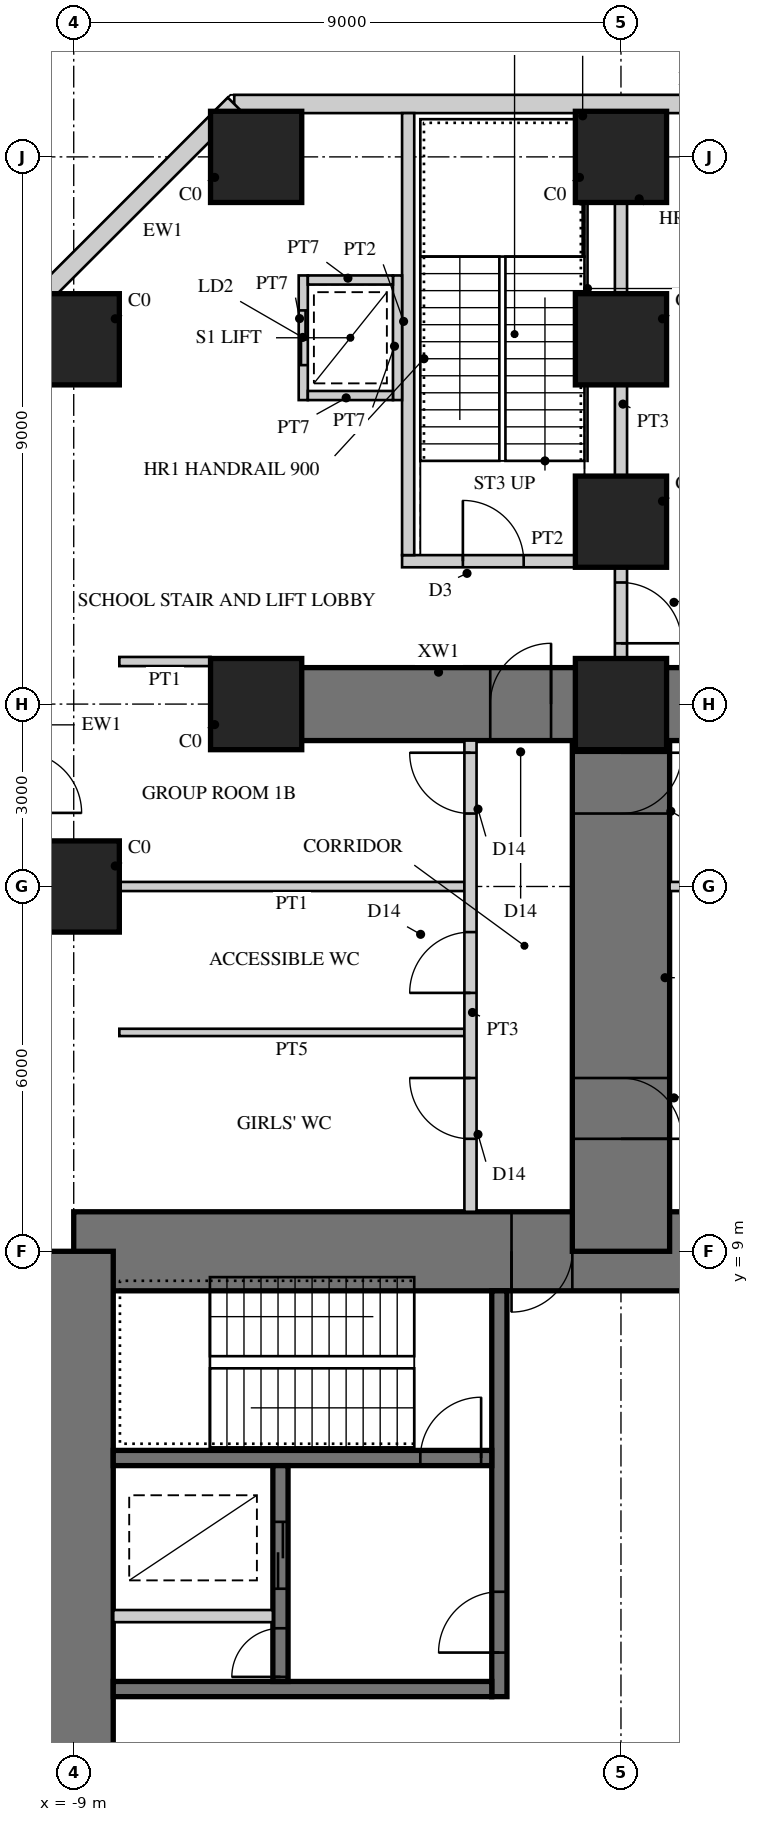
"""IFC4 building model, lengths in metres.
Left out: names, types, materials, properties, quantities, classifications, styles, units other than length and angle.
Written with IfcOpenShell. Run it as: python <this file> out.ifc"""

import sys

from ifc_helpers import new_model, si_unit, direction, frame, frame_2d, origin, origin_2d, place, context, subcontext, project, spatial, rectangle, extrude, element, fill, save


model = new_model("IFC4")
c1 = context("Model", 3, precision=1e-05, world=origin(), true_north=direction((0.0, 1.0)))
c2 = subcontext(c1, "Body", "Model", "MODEL_VIEW")
j1 = project(units=[si_unit("LENGTHUNIT", "METRE"), si_unit("PLANEANGLEUNIT", "RADIAN")], contexts=[c1])
p1 = place(None, origin())
s1 = spatial("IfcSite", under=j1, at=p1, CompositionType="ELEMENT")
p2 = place(p1, origin())
s2 = spatial("IfcBuilding", under=s1, at=p2, CompositionType="ELEMENT")
p3 = place(p2, frame((0.0, 0.0, 5.0)))
s3 = spatial("IfcBuildingStorey", under=s2, at=p3, CompositionType="ELEMENT", Elevation=5.0)
p4 = place(p3, frame((9.0, 9.0, 0.0), z_axis=(0.0, 0.0, 1.0), x_axis=(-1.0, 0.0, 0.0)))
e1 = element("IfcWall", 1, at=p4, inside=s3, PredefinedType="SHEAR", context=c2, shape_type="SweptSolid", body=[
    extrude(rectangle(XDim=18.0, YDim=1.3, at=frame_2d((9.0, 0.0))), origin(), (0.0, 0.0, 1.0), 4.5),
])
p5 = place(p4, frame((9.8, 0.0, 0.0)))
e2 = element("IfcOpeningElement", 2, at=p5, cuts=e1, PredefinedType="OPENING", context=c2, shape_type="SweptSolid", body=[
    extrude(rectangle(XDim=1.0, YDim=2.4, at=frame_2d((0.5, 1.2))), frame((0.0, 0.66, 0.0), z_axis=(0.0, -1.0, 0.0), x_axis=(1.0, 0.0, 0.0)), (0.0, 0.0, 1.0), 1.32),
])
p6 = place(p3, frame((-9.0, 9.0, 0.0), z_axis=(0.0, 0.0, 1.0), x_axis=(0.0, -1.0, 0.0)))
e3 = element("IfcWall", 3, at=p6, inside=s3, PredefinedType="SHEAR", context=c2, shape_type="SweptSolid", body=[
    extrude(rectangle(XDim=18.0, YDim=1.3, at=frame_2d((9.0, 0.0))), origin(), (0.0, 0.0, 1.0), 4.5),
])
p7 = place(p6, frame((9.8, 0.0, 0.0)))
e4 = element("IfcOpeningElement", 4, at=p7, cuts=e3, PredefinedType="OPENING", context=c2, shape_type="SweptSolid", body=[
    extrude(rectangle(XDim=1.0, YDim=2.4, at=frame_2d((0.5, 1.2))), frame((0.0, 0.66, 0.0), z_axis=(0.0, -1.0, 0.0), x_axis=(1.0, 0.0, 0.0)), (0.0, 0.0, 1.0), 1.32),
])
p8 = place(p3, frame((-2.0, 1.675, 0.0), z_axis=(0.0, 0.0, 1.0), x_axis=(0.0, 1.0, 0.0)))
e5 = element("IfcWall", 5, at=p8, inside=s3, PredefinedType="SHEAR", context=c2, shape_type="SweptSolid", body=[
    extrude(rectangle(XDim=6.675, YDim=0.25, at=frame_2d((3.337, 0.0))), origin(), (0.0, 0.0, 1.0), 4.5),
])
p9 = place(p8, frame((0.725, 0.0, 0.0)))
e6 = element("IfcOpeningElement", 6, at=p9, cuts=e5, PredefinedType="OPENING", context=c2, shape_type="SweptSolid", body=[
    extrude(rectangle(XDim=1.0, YDim=2.1, at=frame_2d((0.5, 1.05))), frame((0.0, 0.135, 0.0), z_axis=(0.0, -1.0, 0.0), x_axis=(1.0, 0.0, 0.0)), (0.0, 0.0, 1.0), 0.27),
])
p10 = place(p3, frame((-2.125, 1.8, 0.0), z_axis=(0.0, 0.0, 1.0), x_axis=(-1.0, 0.0, 0.0)))
e7 = element("IfcWall", 7, at=p10, inside=s3, PredefinedType="SHEAR", context=c2, shape_type="SweptSolid", body=[
    extrude(rectangle(XDim=6.225, YDim=0.25, at=frame_2d((3.113, 0.0))), origin(), (0.0, 0.0, 1.0), 4.5),
])
p11 = place(p3, frame((-2.125, 5.6, 0.0), z_axis=(0.0, 0.0, 1.0), x_axis=(-1.0, 0.0, 0.0)))
e8 = element("IfcWall", 8, at=p11, inside=s3, PredefinedType="SHEAR", context=c2, shape_type="SweptSolid", body=[
    extrude(rectangle(XDim=6.225, YDim=0.25, at=frame_2d((3.113, 0.0))), origin(), (0.0, 0.0, 1.0), 4.5),
])
p12 = place(p11, frame((0.175, 0.0, 0.0)))
e9 = element("IfcOpeningElement", 9, at=p12, cuts=e8, PredefinedType="OPENING", context=c2, shape_type="SweptSolid", body=[
    extrude(rectangle(XDim=1.0, YDim=2.1, at=frame_2d((0.5, 1.05))), frame((0.0, 0.135, 0.0), z_axis=(0.0, -1.0, 0.0), x_axis=(1.0, 0.0, 0.0)), (0.0, 0.0, 1.0), 0.27),
])
p13 = place(p3, frame((-5.6, 1.925, 0.0), z_axis=(0.0, 0.0, 1.0), x_axis=(0.0, 1.0, 0.0)))
e10 = element("IfcWall", 10, at=p13, inside=s3, PredefinedType="SHEAR", context=c2, shape_type="SweptSolid", body=[
    extrude(rectangle(XDim=3.55, YDim=0.25, at=frame_2d((1.775, 0.0))), origin(), (0.0, 0.0, 1.0), 4.5),
])
p14 = place(p13, frame((1.525, 0.0, 0.0)))
e11 = element("IfcOpeningElement", 11, at=p14, cuts=e10, PredefinedType="OPENING", context=c2, shape_type="SweptSolid", body=[
    extrude(rectangle(XDim=1.1, YDim=2.2, at=frame_2d((0.55, 1.1))), frame((0.0, 0.135, 0.0), z_axis=(0.0, -1.0, 0.0), x_axis=(1.0, 0.0, 0.0)), (0.0, 0.0, 1.0), 0.27),
])
p15 = place(p13, frame((0.075, 0.0, 0.0)))
e12 = element("IfcOpeningElement", 12, at=p15, cuts=e10, PredefinedType="OPENING", context=c2, shape_type="SweptSolid", body=[
    extrude(rectangle(XDim=0.8, YDim=2.1, at=frame_2d((0.4, 1.05))), frame((0.0, 0.135, 0.0), z_axis=(0.0, -1.0, 0.0), x_axis=(1.0, 0.0, 0.0)), (0.0, 0.0, 1.0), 0.27),
])
p16 = place(p3, frame((-5.725, 3.0, 0.0), z_axis=(0.0, 0.0, 1.0), x_axis=(-1.0, 0.0, 0.0)))
e13 = element("IfcWall", 13, at=p16, inside=s3, PredefinedType="PARTITIONING", context=c2, shape_type="SweptSolid", body=[
    extrude(rectangle(XDim=2.625, YDim=0.2, at=frame_2d((1.312, 0.0))), origin(), (0.0, 0.0, 1.0), 4.5),
])
p17 = place(p3, frame((0.0, 9.0, 0.0), z_axis=(0.0, 0.0, 1.0), x_axis=(0.0, 1.0, 0.0)))
e14 = element("IfcWall", 14, at=p17, inside=s3, PredefinedType="SHEAR", context=c2, shape_type="SweptSolid", body=[
    extrude(rectangle(XDim=9.0, YDim=1.6, at=frame_2d((4.5, 0.0))), origin(), (0.0, 0.0, 1.0), 4.5),
])
p18 = place(p17, frame((1.85, 0.0, 0.0)))
e15 = element("IfcOpeningElement", 15, at=p18, cuts=e14, PredefinedType="OPENING", context=c2, shape_type="SweptSolid", body=[
    extrude(rectangle(XDim=1.0, YDim=2.2, at=frame_2d((0.5, 1.1))), frame((0.0, 0.81, 0.0), z_axis=(0.0, -1.0, 0.0), x_axis=(1.0, 0.0, 0.0)), (0.0, 0.0, 1.0), 1.62),
])
p19 = place(p17, frame((7.2, 0.0, 0.0)))
e16 = element("IfcOpeningElement", 16, at=p19, cuts=e14, PredefinedType="OPENING", context=c2, shape_type="SweptSolid", body=[
    extrude(rectangle(XDim=1.0, YDim=2.2, at=frame_2d((0.5, 1.1))), frame((0.0, 0.81, 0.0), z_axis=(0.0, -1.0, 0.0), x_axis=(1.0, 0.0, 0.0)), (0.0, 0.0, 1.0), 1.62),
])
p20 = place(p3, frame((0.0, 18.0, 0.0), z_axis=(0.0, 0.0, 1.0), x_axis=(-1.0, 0.0, 0.0)))
e17 = element("IfcWall", 17, at=p20, inside=s3, PredefinedType="SHEAR", context=c2, shape_type="SweptSolid", body=[
    extrude(rectangle(XDim=6.0, YDim=1.2, at=frame_2d((3.0, 0.0))), origin(), (0.0, 0.0, 1.0), 4.5),
])
p21 = place(p20, frame((1.15, 0.0, 0.0)))
e18 = element("IfcOpeningElement", 18, at=p21, cuts=e17, PredefinedType="OPENING", context=c2, shape_type="SweptSolid", body=[
    extrude(rectangle(XDim=1.0, YDim=2.2, at=frame_2d((0.5, 1.1))), frame((0.0, 0.61, 0.0), z_axis=(0.0, -1.0, 0.0), x_axis=(1.0, 0.0, 0.0)), (0.0, 0.0, 1.0), 1.22),
])
p22 = place(p3, frame((0.0, 18.0, 0.0), z_axis=(0.0, 0.0, 1.0), x_axis=(1.0, 0.0, 0.0)))
e19 = element("IfcWall", 19, at=p22, inside=s3, PredefinedType="SHEAR", context=c2, shape_type="SweptSolid", body=[
    extrude(rectangle(XDim=6.0, YDim=1.2, at=frame_2d((3.0, 0.0))), origin(), (0.0, 0.0, 1.0), 4.5),
])
for number, where, z_axis, x_axis in (
    (20, (-9.0, 15.0, 0.0), (0.0, 0.0, 1.0), (1.0, 0.0, 0.0)),
    (21, (-9.0, 24.0, 0.0), (0.0, 0.0, 1.0), (1.0, 0.0, 0.0)),
    (22, (0.0, 27.0, 0.0), (0.0, 0.0, 1.0), (1.0, 0.0, 0.0)),
    (23, (-6.0, 27.0, 0.0), (0.0, 0.0, 1.0), (1.0, 0.0, 0.0)),
    (24, (0.0, 18.0, 0.0), (0.0, 0.0, 1.0), (1.0, 0.0, 0.0)),
    (25, (-6.0, 18.0, 0.0), (0.0, 0.0, 1.0), (1.0, 0.0, 0.0)),
    (26, (0.0, 21.0, 0.0), (0.0, 0.0, 1.0), (1.0, 0.0, 0.0)),
    (27, (0.0, 24.0, 0.0), (0.0, 0.0, 1.0), (1.0, 0.0, 0.0)),
):
    element("IfcColumn", number, at=place(p3, frame(where, z_axis=z_axis, x_axis=x_axis)), inside=s3, PredefinedType="COLUMN", context=c2, shape_type="SweptSolid", body=[
        extrude(rectangle(XDim=1.5, YDim=1.5, at=origin_2d()), origin(), (0.0, 0.0, 1.0), 4.5),
    ])
p23 = place(p3, frame((6.36, 27.87, 0.0), z_axis=(0.0, 0.0, 1.0), x_axis=(-1.0, 0.0, 0.0)))
e28 = element("IfcWall", 28, at=p23, inside=s3, PredefinedType="SOLIDWALL", context=c2, shape_type="SweptSolid", body=[
    extrude(rectangle(XDim=12.721, YDim=0.3, at=frame_2d((6.36, 0.0))), origin(), (0.0, 0.0, 1.0), 4.3),
])
p24 = place(p3, frame((-6.36, 27.87, 0.0), z_axis=(0.0, 0.0, 1.0), x_axis=(-0.707106781187, -0.707106781187, 0.0)))
e29 = element("IfcWall", 29, at=p24, inside=s3, PredefinedType="SOLIDWALL", context=c2, shape_type="SweptSolid", body=[
    extrude(rectangle(XDim=4.964, YDim=0.3, at=frame_2d((2.482, 0.0))), origin(), (0.0, 0.0, 1.0), 4.3),
])
p25 = place(p3, frame((-2.575, 15.0, 0.0), z_axis=(0.0, 0.0, 1.0), x_axis=(-1.0, 0.0, 0.0)))
e30 = element("IfcWall", 30, at=p25, inside=s3, PredefinedType="PARTITIONING", context=c2, shape_type="SweptSolid", body=[
    extrude(rectangle(XDim=5.675, YDim=0.15, at=frame_2d((2.837, 0.0))), origin(), (0.0, 0.0, 1.0), 3.35),
])
p26 = place(p3, frame((8.25, 15.0, 0.0), z_axis=(0.0, 0.0, 1.0), x_axis=(-1.0, 0.0, 0.0)))
e31 = element("IfcWall", 31, at=p26, inside=s3, PredefinedType="PARTITIONING", context=c2, shape_type="SweptSolid", body=[
    extrude(rectangle(XDim=7.45, YDim=0.15, at=frame_2d((3.725, 0.0))), origin(), (0.0, 0.0, 1.0), 3.35),
])
p27 = place(p3, frame((-2.575, 12.6, 0.0), z_axis=(0.0, 0.0, 1.0), x_axis=(-1.0, 0.0, 0.0)))
e32 = element("IfcWall", 32, at=p27, inside=s3, PredefinedType="PLUMBINGWALL", context=c2, shape_type="SweptSolid", body=[
    extrude(rectangle(XDim=5.675, YDim=0.12, at=frame_2d((2.837, 0.0))), origin(), (0.0, 0.0, 1.0), 4.3),
])
p28 = place(p3, frame((-2.475, 9.65, 0.0), z_axis=(0.0, 0.0, 1.0), x_axis=(0.0, 1.0, 0.0)))
e33 = element("IfcWall", 33, at=p28, inside=s3, PredefinedType="SOLIDWALL", context=c2, shape_type="SweptSolid", body=[
    extrude(rectangle(XDim=7.75, YDim=0.2, at=frame_2d((3.875, 0.0))), origin(), (0.0, 0.0, 1.0), 4.3),
])
p29 = place(p28, frame((1.2, 0.0, 0.0)))
e34 = element("IfcOpeningElement", 34, at=p29, cuts=e33, PredefinedType="OPENING", context=c2, shape_type="SweptSolid", body=[
    extrude(rectangle(XDim=1.0, YDim=2.2, at=frame_2d((0.5, 1.1))), frame((0.0, 0.11, 0.0), z_axis=(0.0, -1.0, 0.0), x_axis=(1.0, 0.0, 0.0)), (0.0, 0.0, 1.0), 0.22),
])
p30 = place(p28, frame((3.6, 0.0, 0.0)))
e35 = element("IfcOpeningElement", 35, at=p30, cuts=e33, PredefinedType="OPENING", context=c2, shape_type="SweptSolid", body=[
    extrude(rectangle(XDim=1.0, YDim=2.2, at=frame_2d((0.5, 1.1))), frame((0.0, 0.11, 0.0), z_axis=(0.0, -1.0, 0.0), x_axis=(1.0, 0.0, 0.0)), (0.0, 0.0, 1.0), 0.22),
])
p31 = place(p28, frame((6.55, 0.0, 0.0)))
e36 = element("IfcOpeningElement", 36, at=p31, cuts=e33, PredefinedType="OPENING", context=c2, shape_type="SweptSolid", body=[
    extrude(rectangle(XDim=1.0, YDim=2.2, at=frame_2d((0.5, 1.1))), frame((0.0, 0.11, 0.0), z_axis=(0.0, -1.0, 0.0), x_axis=(1.0, 0.0, 0.0)), (0.0, 0.0, 1.0), 0.22),
])
p32 = place(p3, frame((-6.75, 18.7, 0.0), z_axis=(0.0, 0.0, 1.0), x_axis=(-1.0, 0.0, 0.0)))
e37 = element("IfcWall", 37, at=p32, inside=s3, PredefinedType="PARTITIONING", context=c2, shape_type="SweptSolid", body=[
    extrude(rectangle(XDim=1.5, YDim=0.15, at=frame_2d((0.75, 0.0))), origin(), (0.0, 0.0, 1.0), 4.3),
])
p33 = place(p3, frame((-0.1, 20.35, 0.0), z_axis=(0.0, 0.0, 1.0), x_axis=(-1.0, 0.0, 0.0)))
e38 = element("IfcWall", 38, at=p33, inside=s3, PredefinedType="SOLIDWALL", context=c2, shape_type="SweptSolid", body=[
    extrude(rectangle(XDim=3.5, YDim=0.2, at=frame_2d((1.75, 0.0))), origin(), (0.0, 0.0, 1.0), 4.3),
])
p34 = place(p33, frame((1.5, 0.0, 0.0)))
e39 = element("IfcOpeningElement", 39, at=p34, cuts=e38, PredefinedType="OPENING", context=c2, shape_type="SweptSolid", body=[
    extrude(rectangle(XDim=1.0, YDim=2.1, at=frame_2d((0.5, 1.05))), frame((0.0, 0.11, 0.0), z_axis=(0.0, -1.0, 0.0), x_axis=(1.0, 0.0, 0.0)), (0.0, 0.0, 1.0), 0.22),
])
p35 = place(p3, frame((-3.5, 20.45, 0.0), z_axis=(0.0, 0.0, 1.0), x_axis=(0.0, 1.0, 0.0)))
e40 = element("IfcWall", 40, at=p35, inside=s3, PredefinedType="SOLIDWALL", context=c2, shape_type="SweptSolid", body=[
    extrude(rectangle(XDim=7.27, YDim=0.2, at=frame_2d((3.635, 0.0))), origin(), (0.0, 0.0, 1.0), 4.3),
])
p36 = place(p3, frame((-3.675, 23.0, 0.0), z_axis=(0.0, 0.0, 1.0), x_axis=(0.0, 1.0, 0.0)))
e41 = element("IfcWall", 41, at=p36, inside=s3, PredefinedType="PARTITIONING", context=c2, shape_type="SweptSolid", body=[
    extrude(rectangle(XDim=2.05, YDim=0.15, at=frame_2d((1.025, 0.0))), origin(), (0.0, 0.0, 1.0), 4.3),
])
p37 = place(p3, frame((-5.225, 23.0, 0.0), z_axis=(0.0, 0.0, 1.0), x_axis=(0.0, 1.0, 0.0)))
e42 = element("IfcWall", 42, at=p37, inside=s3, PredefinedType="PARTITIONING", context=c2, shape_type="SweptSolid", body=[
    extrude(rectangle(XDim=2.05, YDim=0.15, at=frame_2d((1.025, 0.0))), origin(), (0.0, 0.0, 1.0), 4.3),
])
p38 = place(p37, frame((0.575, 0.0, 0.0)))
e43 = element("IfcOpeningElement", 43, at=p38, cuts=e42, PredefinedType="OPENING", context=c2, shape_type="SweptSolid", body=[
    extrude(rectangle(XDim=0.9, YDim=2.1, at=frame_2d((0.45, 1.05))), frame((0.0, 0.085, 0.0), z_axis=(0.0, -1.0, 0.0), x_axis=(1.0, 0.0, 0.0)), (0.0, 0.0, 1.0), 0.17),
])
for number, where, z_axis, x_axis in (
    (44, (-3.75, 23.075, 0.0), (0.0, 0.0, 1.0), (-1.0, 0.0, 0.0)),
    (45, (-3.75, 24.975, 0.0), (0.0, 0.0, 1.0), (-1.0, 0.0, 0.0)),
):
    element("IfcWall", number, at=place(p3, frame(where, z_axis=z_axis, x_axis=x_axis)), inside=s3, PredefinedType="PARTITIONING", context=c2, shape_type="SweptSolid", body=[
        extrude(rectangle(XDim=1.4, YDim=0.15, at=frame_2d((0.7, 0.0))), origin(), (0.0, 0.0, 1.0), 4.3),
    ])
p39 = place(p3, frame((0.0, 18.0, 0.0), z_axis=(0.0, 0.0, 1.0), x_axis=(0.0, 1.0, 0.0)))
e46 = element("IfcWall", 46, at=p39, inside=s3, PredefinedType="SOLIDWALL", context=c2, shape_type="SweptSolid", body=[
    extrude(rectangle(XDim=3.0, YDim=0.2, at=frame_2d((1.5, 0.0))), origin(), (0.0, 0.0, 1.0), 4.3),
])
p40 = place(p39, frame((1.0, 0.0, 0.0)))
e47 = element("IfcOpeningElement", 47, at=p40, cuts=e46, PredefinedType="OPENING", context=c2, shape_type="SweptSolid", body=[
    extrude(rectangle(XDim=1.0, YDim=2.2, at=frame_2d((0.5, 1.1))), frame((0.0, 0.11, 0.0), z_axis=(0.0, -1.0, 0.0), x_axis=(1.0, 0.0, 0.0)), (0.0, 0.0, 1.0), 0.22),
])
p41 = place(p3, frame((0.0, 21.0, 0.0), z_axis=(0.0, 0.0, 1.0), x_axis=(0.0, 1.0, 0.0)))
e48 = element("IfcWall", 48, at=p41, inside=s3, PredefinedType="SOLIDWALL", context=c2, shape_type="SweptSolid", body=[
    extrude(rectangle(XDim=6.0, YDim=0.2, at=frame_2d((3.0, 0.0))), origin(), (0.0, 0.0, 1.0), 3.3),
])
p42 = place(p29, origin())
e49 = element("IfcDoor", 49, at=p42, inside=s3, OperationType="SINGLE_SWING_RIGHT", PredefinedType="DOOR", context=c2, shape_type="SweptSolid", body=[
    extrude(rectangle(XDim=1.0, YDim=2.2, at=frame_2d((0.5, 1.1))), frame((0.0, 0.025, 0.0), z_axis=(0.0, -1.0, 0.0), x_axis=(1.0, 0.0, 0.0)), (0.0, 0.0, 1.0), 0.05),
])
fill(e34, e49)
p43 = place(p30, origin())
e50 = element("IfcDoor", 50, at=p43, inside=s3, OperationType="SINGLE_SWING_LEFT", PredefinedType="DOOR", context=c2, shape_type="SweptSolid", body=[
    extrude(rectangle(XDim=1.0, YDim=2.2, at=frame_2d((0.5, 1.1))), frame((0.0, 0.025, 0.0), z_axis=(0.0, -1.0, 0.0), x_axis=(1.0, 0.0, 0.0)), (0.0, 0.0, 1.0), 0.05),
])
fill(e35, e50)
p44 = place(p31, origin())
e51 = element("IfcDoor", 51, at=p44, inside=s3, OperationType="SINGLE_SWING_RIGHT", PredefinedType="DOOR", context=c2, shape_type="SweptSolid", body=[
    extrude(rectangle(XDim=1.0, YDim=2.2, at=frame_2d((0.5, 1.1))), frame((0.0, 0.025, 0.0), z_axis=(0.0, -1.0, 0.0), x_axis=(1.0, 0.0, 0.0)), (0.0, 0.0, 1.0), 0.05),
])
fill(e36, e51)
p45 = place(p34, frame((1.0, 0.0, 0.0), z_axis=(0.0, 0.0, 1.0), x_axis=(-1.0, 0.0, 0.0)))
e52 = element("IfcDoor", 52, at=p45, inside=s3, OperationType="SINGLE_SWING_LEFT", PredefinedType="DOOR", context=c2, shape_type="SweptSolid", body=[
    extrude(rectangle(XDim=1.0, YDim=2.1, at=frame_2d((0.5, 1.05))), frame((0.0, 0.025, 0.0), z_axis=(0.0, -1.0, 0.0), x_axis=(1.0, 0.0, 0.0)), (0.0, 0.0, 1.0), 0.05),
])
fill(e39, e52)
p46 = place(p38, origin())
e53 = element("IfcDoor", 53, at=p46, inside=s3, OperationType="DOUBLE_DOOR_SLIDING", PredefinedType="DOOR", context=c2, shape_type="SweptSolid", body=[
    extrude(rectangle(XDim=0.9, YDim=2.1, at=frame_2d((0.45, 1.05))), frame((0.0, 0.025, 0.0), z_axis=(0.0, -1.0, 0.0), x_axis=(1.0, 0.0, 0.0)), (0.0, 0.0, 1.0), 0.05),
])
fill(e43, e53)
p47 = place(p18, frame((1.0, 0.0, 0.0), z_axis=(0.0, 0.0, 1.0), x_axis=(-1.0, 0.0, 0.0)))
e54 = element("IfcDoor", 54, at=p47, inside=s3, OperationType="SINGLE_SWING_RIGHT", PredefinedType="DOOR", context=c2, shape_type="SweptSolid", body=[
    extrude(rectangle(XDim=1.0, YDim=2.2, at=frame_2d((0.5, 1.1))), frame((0.0, 0.025, 0.0), z_axis=(0.0, -1.0, 0.0), x_axis=(1.0, 0.0, 0.0)), (0.0, 0.0, 1.0), 0.05),
])
fill(e15, e54)
p48 = place(p19, frame((1.0, 0.0, 0.0), z_axis=(0.0, 0.0, 1.0), x_axis=(-1.0, 0.0, 0.0)))
e55 = element("IfcDoor", 55, at=p48, inside=s3, OperationType="SINGLE_SWING_LEFT", PredefinedType="DOOR", context=c2, shape_type="SweptSolid", body=[
    extrude(rectangle(XDim=1.0, YDim=2.2, at=frame_2d((0.5, 1.1))), frame((0.0, 0.025, 0.0), z_axis=(0.0, -1.0, 0.0), x_axis=(1.0, 0.0, 0.0)), (0.0, 0.0, 1.0), 0.05),
])
fill(e16, e55)
p49 = place(p40, frame((1.0, 0.0, 0.0), z_axis=(0.0, 0.0, 1.0), x_axis=(-1.0, 0.0, 0.0)))
e56 = element("IfcDoor", 56, at=p49, inside=s3, OperationType="SINGLE_SWING_RIGHT", PredefinedType="DOOR", context=c2, shape_type="SweptSolid", body=[
    extrude(rectangle(XDim=1.0, YDim=2.2, at=frame_2d((0.5, 1.1))), frame((0.0, 0.025, 0.0), z_axis=(0.0, -1.0, 0.0), x_axis=(1.0, 0.0, 0.0)), (0.0, 0.0, 1.0), 0.05),
])
fill(e47, e56)
p50 = place(p21, frame((1.0, 0.0, 0.0), z_axis=(0.0, 0.0, 1.0), x_axis=(-1.0, 0.0, 0.0)))
e57 = element("IfcDoor", 57, at=p50, inside=s3, OperationType="SINGLE_SWING_RIGHT", PredefinedType="DOOR", context=c2, shape_type="SweptSolid", body=[
    extrude(rectangle(XDim=1.0, YDim=2.2, at=frame_2d((0.5, 1.1))), frame((0.0, 0.025, 0.0), z_axis=(0.0, -1.0, 0.0), x_axis=(1.0, 0.0, 0.0)), (0.0, 0.0, 1.0), 0.05),
])
fill(e18, e57)
p51 = place(p5, origin())
e58 = element("IfcDoor", 58, at=p51, inside=s3, OperationType="SINGLE_SWING_RIGHT", PredefinedType="DOOR", context=c2, shape_type="SweptSolid", body=[
    extrude(rectangle(XDim=1.0, YDim=2.4, at=frame_2d((0.5, 1.2))), frame((0.0, 0.055, 0.0), z_axis=(0.0, -1.0, 0.0), x_axis=(1.0, 0.0, 0.0)), (0.0, 0.0, 1.0), 0.05),
])
fill(e2, e58)
p52 = place(p9, origin())
e59 = element("IfcDoor", 59, at=p52, inside=s3, OperationType="SINGLE_SWING_LEFT", PredefinedType="DOOR", context=c2, shape_type="SweptSolid", body=[
    extrude(rectangle(XDim=1.0, YDim=2.1, at=frame_2d((0.5, 1.05))), frame((0.0, 0.025, 0.0), z_axis=(0.0, -1.0, 0.0), x_axis=(1.0, 0.0, 0.0)), (0.0, 0.0, 1.0), 0.05),
])
fill(e6, e59)
p53 = place(p12, frame((1.0, 0.0, 0.0), z_axis=(0.0, 0.0, 1.0), x_axis=(-1.0, 0.0, 0.0)))
e60 = element("IfcDoor", 60, at=p53, inside=s3, OperationType="SINGLE_SWING_RIGHT", PredefinedType="DOOR", context=c2, shape_type="SweptSolid", body=[
    extrude(rectangle(XDim=1.0, YDim=2.1, at=frame_2d((0.5, 1.05))), frame((0.0, 0.025, 0.0), z_axis=(0.0, -1.0, 0.0), x_axis=(1.0, 0.0, 0.0)), (0.0, 0.0, 1.0), 0.05),
])
fill(e9, e60)
p54 = place(p14, origin())
e61 = element("IfcDoor", 61, at=p54, inside=s3, OperationType="DOUBLE_DOOR_SLIDING", PredefinedType="DOOR", context=c2, shape_type="SweptSolid", body=[
    extrude(rectangle(XDim=1.1, YDim=2.2, at=frame_2d((0.55, 1.1))), frame((0.0, 0.025, 0.0), z_axis=(0.0, -1.0, 0.0), x_axis=(1.0, 0.0, 0.0)), (0.0, 0.0, 1.0), 0.05),
])
fill(e11, e61)
p55 = place(p15, origin())
e62 = element("IfcDoor", 62, at=p55, inside=s3, OperationType="SINGLE_SWING_LEFT", PredefinedType="DOOR", context=c2, shape_type="SweptSolid", body=[
    extrude(rectangle(XDim=0.8, YDim=2.1, at=frame_2d((0.4, 1.05))), frame((0.0, 0.025, 0.0), z_axis=(0.0, -1.0, 0.0), x_axis=(1.0, 0.0, 0.0)), (0.0, 0.0, 1.0), 0.05),
])
fill(e12, e62)
save(model, sys.argv[1])
